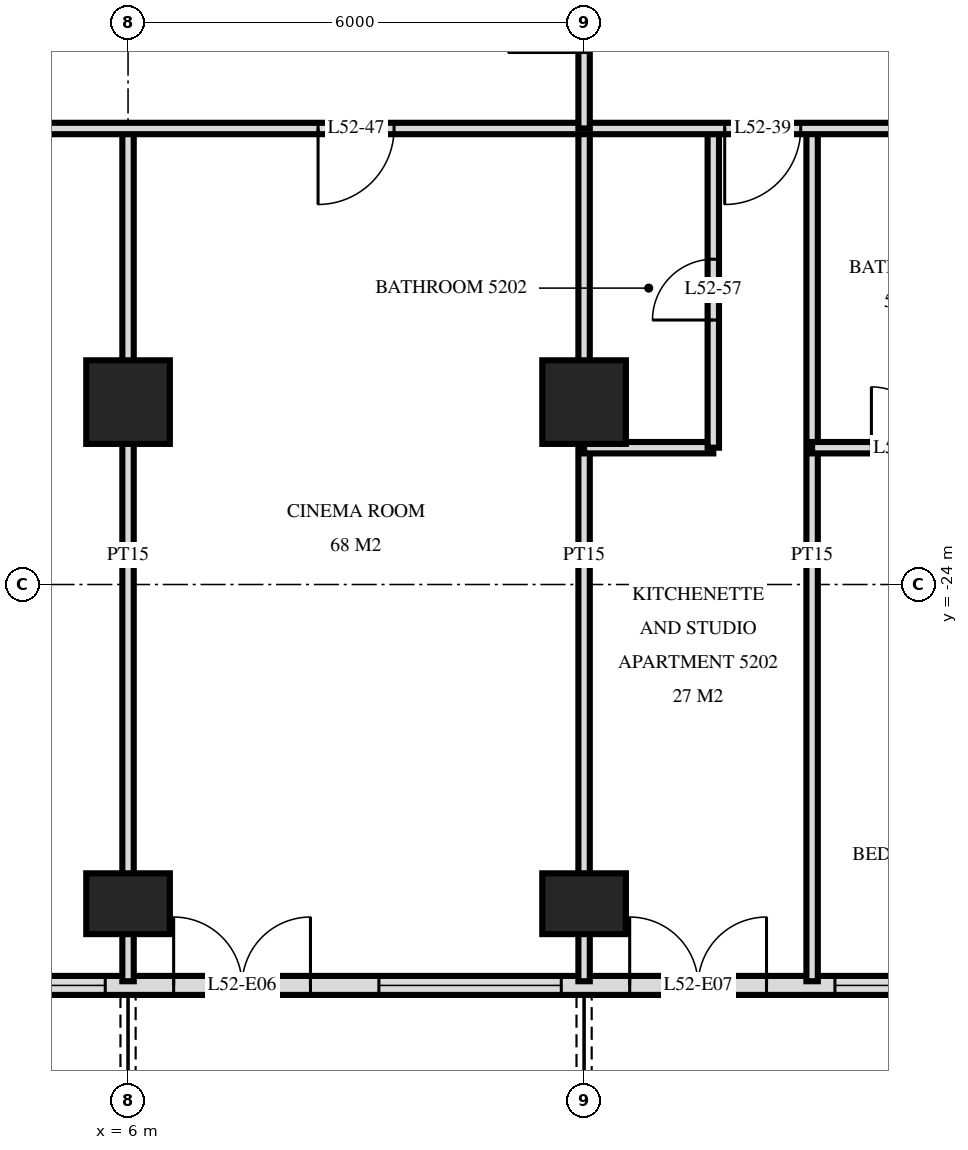
"""IFC4 building model, lengths in metres.
Left out: names, types, materials, properties, quantities, classifications, styles, units other than length and angle.
Written with IfcOpenShell. Run it as: python <this file> out.ifc"""

import sys

from ifc_helpers import new_model, si_unit, direction, frame, frame_2d, origin, origin_2d, place, context, subcontext, project, spatial, rectangle, extrude, element, fill, save


model = new_model("IFC4")
c1 = context("Model", 3, precision=1e-05, world=origin(), true_north=direction((0.0, 1.0)))
c2 = subcontext(c1, "Body", "Model", "MODEL_VIEW")
j1 = project(units=[si_unit("LENGTHUNIT", "METRE"), si_unit("PLANEANGLEUNIT", "RADIAN")], contexts=[c1])
p1 = place(None, origin())
s1 = spatial("IfcSite", under=j1, at=p1, CompositionType="ELEMENT")
p2 = place(p1, origin())
s2 = spatial("IfcBuilding", under=s1, at=p2, CompositionType="ELEMENT")
p3 = place(p2, frame((0.0, 0.0, 201.1)))
s3 = spatial("IfcBuildingStorey", under=s2, at=p3, CompositionType="ELEMENT", Elevation=201.1)
p4 = place(p3, frame((6.0, -28.2, 0.0), z_axis=(0.0, 0.0, 1.0), x_axis=(1.0, 0.0, 0.0)))
e1 = element("IfcColumn", 1, at=p4, inside=s3, PredefinedType="COLUMN", context=c2, shape_type="SweptSolid", body=[
    extrude(rectangle(XDim=1.1, YDim=0.8, at=origin_2d()), origin(), (0.0, 0.0, 1.0), 3.5),
])
p5 = place(p3, frame((6.0, -21.6, 0.0), z_axis=(0.0, 0.0, 1.0), x_axis=(1.0, 0.0, 0.0)))
e2 = element("IfcColumn", 2, at=p5, inside=s3, PredefinedType="COLUMN", context=c2, shape_type="SweptSolid", body=[
    extrude(rectangle(XDim=1.1, YDim=1.1, at=origin_2d()), origin(), (0.0, 0.0, 1.0), 3.5),
])
p6 = place(p3, frame((12.0, -28.2, 0.0), z_axis=(0.0, 0.0, 1.0), x_axis=(1.0, 0.0, 0.0)))
e3 = element("IfcColumn", 3, at=p6, inside=s3, PredefinedType="COLUMN", context=c2, shape_type="SweptSolid", body=[
    extrude(rectangle(XDim=1.1, YDim=0.8, at=origin_2d()), origin(), (0.0, 0.0, 1.0), 3.5),
])
p7 = place(p3, frame((12.0, -21.6, 0.0), z_axis=(0.0, 0.0, 1.0), x_axis=(1.0, 0.0, 0.0)))
e4 = element("IfcColumn", 4, at=p7, inside=s3, PredefinedType="COLUMN", context=c2, shape_type="SweptSolid", body=[
    extrude(rectangle(XDim=1.1, YDim=1.1, at=origin_2d()), origin(), (0.0, 0.0, 1.0), 3.5),
])
p8 = place(p3, frame((-22.475, -29.275, 0.0), z_axis=(0.0, 0.0, 1.0), x_axis=(1.0, 0.0, 0.0)))
e5 = element("IfcWall", 5, at=p8, inside=s3, PredefinedType="SOLIDWALL", context=c2, shape_type="SweptSolid", body=[
    extrude(rectangle(XDim=44.951, YDim=0.25, at=frame_2d((22.475, 0.0))), origin(), (0.0, 0.0, 1.0), 3.22),
])
p9 = place(p8, frame((0.575, 0.0, 0.0)))
e6 = element("IfcOpeningElement", 6, at=p9, cuts=e5, PredefinedType="OPENING", context=c2, shape_type="SweptSolid", body=[
    extrude(rectangle(XDim=1.8, YDim=2.4, at=frame_2d((0.9, 1.2))), frame((0.0, 0.135, 0.0), z_axis=(0.0, -1.0, 0.0), x_axis=(1.0, 0.0, 0.0)), (0.0, 0.0, 1.0), 0.27),
])
p10 = place(p8, frame((4.775, 0.0, 0.9)))
e7 = element("IfcOpeningElement", 7, at=p10, cuts=e5, PredefinedType="OPENING", context=c2, shape_type="SweptSolid", body=[
    extrude(rectangle(XDim=2.4, YDim=1.5, at=frame_2d((1.2, 0.75))), frame((0.0, 0.135, 0.0), z_axis=(0.0, -1.0, 0.0), x_axis=(1.0, 0.0, 0.0)), (0.0, 0.0, 1.0), 0.27),
])
p11 = place(p8, frame((8.075, 0.0, 0.0)))
e8 = element("IfcOpeningElement", 8, at=p11, cuts=e5, PredefinedType="OPENING", context=c2, shape_type="SweptSolid", body=[
    extrude(rectangle(XDim=1.8, YDim=2.4, at=frame_2d((0.9, 1.2))), frame((0.0, 0.135, 0.0), z_axis=(0.0, -1.0, 0.0), x_axis=(1.0, 0.0, 0.0)), (0.0, 0.0, 1.0), 0.27),
])
p12 = place(p8, frame((11.075, 0.0, 0.0)))
e9 = element("IfcOpeningElement", 9, at=p12, cuts=e5, PredefinedType="OPENING", context=c2, shape_type="SweptSolid", body=[
    extrude(rectangle(XDim=1.8, YDim=2.4, at=frame_2d((0.9, 1.2))), frame((0.0, 0.135, 0.0), z_axis=(0.0, -1.0, 0.0), x_axis=(1.0, 0.0, 0.0)), (0.0, 0.0, 1.0), 0.27),
])
p13 = place(p8, frame((13.775, 0.0, 0.9)))
e10 = element("IfcOpeningElement", 10, at=p13, cuts=e5, PredefinedType="OPENING", context=c2, shape_type="SweptSolid", body=[
    extrude(rectangle(XDim=2.4, YDim=1.5, at=frame_2d((1.2, 0.75))), frame((0.0, 0.135, 0.0), z_axis=(0.0, -1.0, 0.0), x_axis=(1.0, 0.0, 0.0)), (0.0, 0.0, 1.0), 0.27),
])
p14 = place(p8, frame((16.775, 0.0, 0.9)))
e11 = element("IfcOpeningElement", 11, at=p14, cuts=e5, PredefinedType="OPENING", context=c2, shape_type="SweptSolid", body=[
    extrude(rectangle(XDim=2.4, YDim=1.5, at=frame_2d((1.2, 0.75))), frame((0.0, 0.135, 0.0), z_axis=(0.0, -1.0, 0.0), x_axis=(1.0, 0.0, 0.0)), (0.0, 0.0, 1.0), 0.27),
])
p15 = place(p8, frame((20.075, 0.0, 0.0)))
e12 = element("IfcOpeningElement", 12, at=p15, cuts=e5, PredefinedType="OPENING", context=c2, shape_type="SweptSolid", body=[
    extrude(rectangle(XDim=1.8, YDim=2.4, at=frame_2d((0.9, 1.2))), frame((0.0, 0.135, 0.0), z_axis=(0.0, -1.0, 0.0), x_axis=(1.0, 0.0, 0.0)), (0.0, 0.0, 1.0), 0.27),
])
p16 = place(p8, frame((23.075, 0.0, 0.0)))
e13 = element("IfcOpeningElement", 13, at=p16, cuts=e5, PredefinedType="OPENING", context=c2, shape_type="SweptSolid", body=[
    extrude(rectangle(XDim=1.8, YDim=2.4, at=frame_2d((0.9, 1.2))), frame((0.0, 0.135, 0.0), z_axis=(0.0, -1.0, 0.0), x_axis=(1.0, 0.0, 0.0)), (0.0, 0.0, 1.0), 0.27),
])
p17 = place(p8, frame((25.775, 0.0, 0.9)))
e14 = element("IfcOpeningElement", 14, at=p17, cuts=e5, PredefinedType="OPENING", context=c2, shape_type="SweptSolid", body=[
    extrude(rectangle(XDim=2.4, YDim=1.5, at=frame_2d((1.2, 0.75))), frame((0.0, 0.135, 0.0), z_axis=(0.0, -1.0, 0.0), x_axis=(1.0, 0.0, 0.0)), (0.0, 0.0, 1.0), 0.27),
])
p18 = place(p8, frame((29.075, 0.0, 0.0)))
e15 = element("IfcOpeningElement", 15, at=p18, cuts=e5, PredefinedType="OPENING", context=c2, shape_type="SweptSolid", body=[
    extrude(rectangle(XDim=1.8, YDim=2.4, at=frame_2d((0.9, 1.2))), frame((0.0, 0.135, 0.0), z_axis=(0.0, -1.0, 0.0), x_axis=(1.0, 0.0, 0.0)), (0.0, 0.0, 1.0), 0.27),
])
p19 = place(p8, frame((31.775, 0.0, 0.9)))
e16 = element("IfcOpeningElement", 16, at=p19, cuts=e5, PredefinedType="OPENING", context=c2, shape_type="SweptSolid", body=[
    extrude(rectangle(XDim=2.4, YDim=1.5, at=frame_2d((1.2, 0.75))), frame((0.0, 0.135, 0.0), z_axis=(0.0, -1.0, 0.0), x_axis=(1.0, 0.0, 0.0)), (0.0, 0.0, 1.0), 0.27),
])
p20 = place(p8, frame((35.075, 0.0, 0.0)))
e17 = element("IfcOpeningElement", 17, at=p20, cuts=e5, PredefinedType="OPENING", context=c2, shape_type="SweptSolid", body=[
    extrude(rectangle(XDim=1.8, YDim=2.4, at=frame_2d((0.9, 1.2))), frame((0.0, 0.135, 0.0), z_axis=(0.0, -1.0, 0.0), x_axis=(1.0, 0.0, 0.0)), (0.0, 0.0, 1.0), 0.27),
])
p21 = place(p8, frame((37.775, 0.0, 0.9)))
e18 = element("IfcOpeningElement", 18, at=p21, cuts=e5, PredefinedType="OPENING", context=c2, shape_type="SweptSolid", body=[
    extrude(rectangle(XDim=2.4, YDim=1.5, at=frame_2d((1.2, 0.75))), frame((0.0, 0.135, 0.0), z_axis=(0.0, -1.0, 0.0), x_axis=(1.0, 0.0, 0.0)), (0.0, 0.0, 1.0), 0.27),
])
p22 = place(p8, frame((41.075, 0.0, 0.0)))
e19 = element("IfcOpeningElement", 19, at=p22, cuts=e5, PredefinedType="OPENING", context=c2, shape_type="SweptSolid", body=[
    extrude(rectangle(XDim=1.8, YDim=2.4, at=frame_2d((0.9, 1.2))), frame((0.0, 0.135, 0.0), z_axis=(0.0, -1.0, 0.0), x_axis=(1.0, 0.0, 0.0)), (0.0, 0.0, 1.0), 0.27),
])
p23 = place(p3, frame((15.0, -29.22, 0.0), z_axis=(0.0, 0.0, 1.0), x_axis=(0.0, 1.0, 0.0)))
e20 = element("IfcWall", 20, at=p23, inside=s3, PredefinedType="PARTITIONING", context=c2, shape_type="SweptSolid", body=[
    extrude(rectangle(XDim=11.22, YDim=0.15, at=frame_2d((5.61, 0.0))), origin(), (0.0, 0.0, 1.0), 3.22),
])
p24 = place(p3, frame((13.7, -22.2, 0.0), z_axis=(0.0, 0.0, 1.0), x_axis=(0.0, 1.0, 0.0)))
e21 = element("IfcWall", 21, at=p24, inside=s3, PredefinedType="PARTITIONING", context=c2, shape_type="SweptSolid", body=[
    extrude(rectangle(XDim=4.2, YDim=0.15, at=frame_2d((2.1, 0.0))), origin(), (0.0, 0.0, 1.0), 3.22),
])
p25 = place(p24, frame((1.68, 0.0, 0.0)))
e22 = element("IfcOpeningElement", 22, at=p25, cuts=e21, PredefinedType="OPENING", context=c2, shape_type="SweptSolid", body=[
    extrude(rectangle(XDim=0.8, YDim=2.1, at=frame_2d((0.4, 1.05))), frame((0.0, 0.085, 0.0), z_axis=(0.0, -1.0, 0.0), x_axis=(1.0, 0.0, 0.0)), (0.0, 0.0, 1.0), 0.17),
])
p26 = place(p3, frame((12.0, -18.0, 0.0), z_axis=(0.0, 0.0, 1.0), x_axis=(0.0, 1.0, 0.0)))
e23 = element("IfcWall", 23, at=p26, inside=s3, PredefinedType="PARTITIONING", context=c2, shape_type="SweptSolid", body=[
    extrude(rectangle(XDim=2.95, YDim=0.15, at=frame_2d((1.475, 0.0))), origin(), (0.0, 0.0, 1.0), 3.22),
])
p27 = place(p26, frame((1.0, 0.0, 0.0)))
e24 = element("IfcOpeningElement", 24, at=p27, cuts=e23, PredefinedType="OPENING", context=c2, shape_type="SweptSolid", body=[
    extrude(rectangle(XDim=1.0, YDim=2.1, at=frame_2d((0.5, 1.05))), frame((0.0, 0.085, 0.0), z_axis=(0.0, -1.0, 0.0), x_axis=(1.0, 0.0, 0.0)), (0.0, 0.0, 1.0), 0.17),
])
for number, where, z_axis, x_axis in (
    (25, (12.0, -29.22, 0.0), (0.0, 0.0, 1.0), (0.0, 1.0, 0.0)),
    (26, (6.0, -29.22, 0.0), (0.0, 0.0, 1.0), (0.0, 1.0, 0.0)),
):
    element("IfcWall", number, at=place(p3, frame(where, z_axis=z_axis, x_axis=x_axis)), inside=s3, PredefinedType="PARTITIONING", context=c2, shape_type="SweptSolid", body=[
        extrude(rectangle(XDim=11.22, YDim=0.15, at=frame_2d((5.61, 0.0))), origin(), (0.0, 0.0, 1.0), 3.22),
    ])
p28 = place(p3, frame((12.0, -22.2, 0.0), z_axis=(0.0, 0.0, 1.0), x_axis=(1.0, 0.0, 0.0)))
e27 = element("IfcWall", 27, at=p28, inside=s3, PredefinedType="PARTITIONING", context=c2, shape_type="SweptSolid", body=[
    extrude(rectangle(XDim=1.7, YDim=0.15, at=frame_2d((0.85, 0.0))), origin(), (0.0, 0.0, 1.0), 3.22),
])
p29 = place(p3, frame((15.0, -22.2, 0.0), z_axis=(0.0, 0.0, 1.0), x_axis=(1.0, 0.0, 0.0)))
e28 = element("IfcWall", 28, at=p29, inside=s3, PredefinedType="PARTITIONING", context=c2, shape_type="SweptSolid", body=[
    extrude(rectangle(XDim=6.4, YDim=0.15, at=frame_2d((3.2, 0.0))), origin(), (0.0, 0.0, 1.0), 3.22),
])
p30 = place(p29, frame((0.78, 0.0, 0.0)))
e29 = element("IfcOpeningElement", 29, at=p30, cuts=e28, PredefinedType="OPENING", context=c2, shape_type="SweptSolid", body=[
    extrude(rectangle(XDim=0.8, YDim=2.1, at=frame_2d((0.4, 1.05))), frame((0.0, 0.085, 0.0), z_axis=(0.0, -1.0, 0.0), x_axis=(1.0, 0.0, 0.0)), (0.0, 0.0, 1.0), 0.17),
])
p31 = place(p29, frame((3.65, 0.0, 0.0)))
e30 = element("IfcOpeningElement", 30, at=p31, cuts=e28, PredefinedType="OPENING", context=c2, shape_type="SweptSolid", body=[
    extrude(rectangle(XDim=0.8, YDim=2.1, at=frame_2d((0.4, 1.05))), frame((0.0, 0.085, 0.0), z_axis=(0.0, -1.0, 0.0), x_axis=(1.0, 0.0, 0.0)), (0.0, 0.0, 1.0), 0.17),
])
p32 = place(p3, frame((-26.82, -18.0, 0.0), z_axis=(0.0, 0.0, 1.0), x_axis=(1.0, 0.0, 0.0)))
e31 = element("IfcWall", 31, at=p32, inside=s3, PredefinedType="PARTITIONING", context=c2, shape_type="SweptSolid", body=[
    extrude(rectangle(XDim=53.64, YDim=0.15, at=frame_2d((26.82, 0.0))), origin(), (0.0, 0.0, 1.0), 3.22),
])
p33 = place(p32, frame((11.97, 0.0, 0.0)))
e32 = element("IfcOpeningElement", 32, at=p33, cuts=e31, PredefinedType="OPENING", context=c2, shape_type="SweptSolid", body=[
    extrude(rectangle(XDim=1.0, YDim=2.1, at=frame_2d((0.5, 1.05))), frame((0.0, 0.085, 0.0), z_axis=(0.0, -1.0, 0.0), x_axis=(1.0, 0.0, 0.0)), (0.0, 0.0, 1.0), 0.17),
])
p34 = place(p32, frame((3.92, 0.0, 0.0)))
e33 = element("IfcOpeningElement", 33, at=p34, cuts=e31, PredefinedType="OPENING", context=c2, shape_type="SweptSolid", body=[
    extrude(rectangle(XDim=1.0, YDim=2.1, at=frame_2d((0.5, 1.05))), frame((0.0, 0.085, 0.0), z_axis=(0.0, -1.0, 0.0), x_axis=(1.0, 0.0, 0.0)), (0.0, 0.0, 1.0), 0.17),
])
p35 = place(p32, frame((5.72, 0.0, 0.0)))
e34 = element("IfcOpeningElement", 34, at=p35, cuts=e31, PredefinedType="OPENING", context=c2, shape_type="SweptSolid", body=[
    extrude(rectangle(XDim=1.0, YDim=2.1, at=frame_2d((0.5, 1.05))), frame((0.0, 0.085, 0.0), z_axis=(0.0, -1.0, 0.0), x_axis=(1.0, 0.0, 0.0)), (0.0, 0.0, 1.0), 0.17),
])
p36 = place(p32, frame((40.67, 0.0, 0.0)))
e35 = element("IfcOpeningElement", 35, at=p36, cuts=e31, PredefinedType="OPENING", context=c2, shape_type="SweptSolid", body=[
    extrude(rectangle(XDim=1.0, YDim=2.1, at=frame_2d((0.5, 1.05))), frame((0.0, 0.085, 0.0), z_axis=(0.0, -1.0, 0.0), x_axis=(1.0, 0.0, 0.0)), (0.0, 0.0, 1.0), 0.17),
])
p37 = place(p32, frame((48.72, 0.0, 0.0)))
e36 = element("IfcOpeningElement", 36, at=p37, cuts=e31, PredefinedType="OPENING", context=c2, shape_type="SweptSolid", body=[
    extrude(rectangle(XDim=1.0, YDim=2.1, at=frame_2d((0.5, 1.05))), frame((0.0, 0.085, 0.0), z_axis=(0.0, -1.0, 0.0), x_axis=(1.0, 0.0, 0.0)), (0.0, 0.0, 1.0), 0.17),
])
p38 = place(p32, frame((46.92, 0.0, 0.0)))
e37 = element("IfcOpeningElement", 37, at=p38, cuts=e31, PredefinedType="OPENING", context=c2, shape_type="SweptSolid", body=[
    extrude(rectangle(XDim=1.0, YDim=2.1, at=frame_2d((0.5, 1.05))), frame((0.0, 0.085, 0.0), z_axis=(0.0, -1.0, 0.0), x_axis=(1.0, 0.0, 0.0)), (0.0, 0.0, 1.0), 0.17),
])
p39 = place(p32, frame((17.32, 0.0, 0.0)))
e38 = element("IfcOpeningElement", 38, at=p39, cuts=e31, PredefinedType="OPENING", context=c2, shape_type="SweptSolid", body=[
    extrude(rectangle(XDim=1.0, YDim=2.1, at=frame_2d((0.5, 1.05))), frame((0.0, 0.085, 0.0), z_axis=(0.0, -1.0, 0.0), x_axis=(1.0, 0.0, 0.0)), (0.0, 0.0, 1.0), 0.17),
])
p40 = place(p32, frame((23.32, 0.0, 0.0)))
e39 = element("IfcOpeningElement", 39, at=p40, cuts=e31, PredefinedType="OPENING", context=c2, shape_type="SweptSolid", body=[
    extrude(rectangle(XDim=1.0, YDim=2.1, at=frame_2d((0.5, 1.05))), frame((0.0, 0.085, 0.0), z_axis=(0.0, -1.0, 0.0), x_axis=(1.0, 0.0, 0.0)), (0.0, 0.0, 1.0), 0.17),
])
p41 = place(p32, frame((29.32, 0.0, 0.0)))
e40 = element("IfcOpeningElement", 40, at=p41, cuts=e31, PredefinedType="OPENING", context=c2, shape_type="SweptSolid", body=[
    extrude(rectangle(XDim=1.0, YDim=2.1, at=frame_2d((0.5, 1.05))), frame((0.0, 0.085, 0.0), z_axis=(0.0, -1.0, 0.0), x_axis=(1.0, 0.0, 0.0)), (0.0, 0.0, 1.0), 0.17),
])
p42 = place(p32, frame((35.32, 0.0, 0.0)))
e41 = element("IfcOpeningElement", 41, at=p42, cuts=e31, PredefinedType="OPENING", context=c2, shape_type="SweptSolid", body=[
    extrude(rectangle(XDim=1.0, YDim=2.1, at=frame_2d((0.5, 1.05))), frame((0.0, 0.085, 0.0), z_axis=(0.0, -1.0, 0.0), x_axis=(1.0, 0.0, 0.0)), (0.0, 0.0, 1.0), 0.17),
])
p43 = place(p17, origin())
e42 = element("IfcWindow", 42, at=p43, inside=s3, PartitioningType="SINGLE_PANEL", PredefinedType="WINDOW", context=c2, shape_type="SweptSolid", body=[
    extrude(rectangle(XDim=2.4, YDim=1.5, at=frame_2d((1.2, 0.75))), frame((0.0, 0.03, 0.0), z_axis=(0.0, -1.0, 0.0), x_axis=(1.0, 0.0, 0.0)), (0.0, 0.0, 1.0), 0.06),
])
fill(e14, e42)
p44 = place(p18, origin())
e43 = element("IfcDoor", 43, at=p44, inside=s3, OperationType="DOUBLE_DOOR_SINGLE_SWING", PredefinedType="DOOR", context=c2, shape_type="SweptSolid", body=[
    extrude(rectangle(XDim=1.8, YDim=2.4, at=frame_2d((0.9, 1.2))), frame((0.0, 0.025, 0.0), z_axis=(0.0, -1.0, 0.0), x_axis=(1.0, 0.0, 0.0)), (0.0, 0.0, 1.0), 0.05),
])
fill(e15, e43)
p45 = place(p19, origin())
e44 = element("IfcWindow", 44, at=p45, inside=s3, PartitioningType="SINGLE_PANEL", PredefinedType="WINDOW", context=c2, shape_type="SweptSolid", body=[
    extrude(rectangle(XDim=2.4, YDim=1.5, at=frame_2d((1.2, 0.75))), frame((0.0, 0.03, 0.0), z_axis=(0.0, -1.0, 0.0), x_axis=(1.0, 0.0, 0.0)), (0.0, 0.0, 1.0), 0.06),
])
fill(e16, e44)
p46 = place(p20, origin())
e45 = element("IfcDoor", 45, at=p46, inside=s3, OperationType="DOUBLE_DOOR_SINGLE_SWING", PredefinedType="DOOR", context=c2, shape_type="SweptSolid", body=[
    extrude(rectangle(XDim=1.8, YDim=2.4, at=frame_2d((0.9, 1.2))), frame((0.0, 0.025, 0.0), z_axis=(0.0, -1.0, 0.0), x_axis=(1.0, 0.0, 0.0)), (0.0, 0.0, 1.0), 0.05),
])
fill(e17, e45)
p47 = place(p21, origin())
e46 = element("IfcWindow", 46, at=p47, inside=s3, PartitioningType="SINGLE_PANEL", PredefinedType="WINDOW", context=c2, shape_type="SweptSolid", body=[
    extrude(rectangle(XDim=2.4, YDim=1.5, at=frame_2d((1.2, 0.75))), frame((0.0, 0.03, 0.0), z_axis=(0.0, -1.0, 0.0), x_axis=(1.0, 0.0, 0.0)), (0.0, 0.0, 1.0), 0.06),
])
fill(e18, e46)
p48 = place(p36, frame((0.5, 0.0, 0.0), z_axis=(0.0, 0.0, 1.0), x_axis=(-1.0, 0.0, 0.0)))
e47 = element("IfcDoor", 47, at=p48, inside=s3, OperationType="SINGLE_SWING_LEFT", PredefinedType="DOOR", context=c2, shape_type="SweptSolid", body=[
    extrude(rectangle(XDim=1.0, YDim=2.1, at=frame_2d((0.0, 1.05))), frame((0.0, -0.025, 0.0), z_axis=(0.0, 1.0, 0.0), x_axis=(-1.0, 0.0, 0.0)), (0.0, 0.0, 1.0), 0.05),
])
fill(e35, e47)
p49 = place(p42, frame((0.5, 0.0, 0.0), z_axis=(0.0, 0.0, 1.0), x_axis=(-1.0, 0.0, 0.0)))
e48 = element("IfcDoor", 48, at=p49, inside=s3, OperationType="SINGLE_SWING_LEFT", PredefinedType="DOOR", context=c2, shape_type="SweptSolid", body=[
    extrude(rectangle(XDim=1.0, YDim=2.1, at=frame_2d((0.0, 1.05))), frame((0.0, -0.025, 0.0), z_axis=(0.0, 1.0, 0.0), x_axis=(-1.0, 0.0, 0.0)), (0.0, 0.0, 1.0), 0.05),
])
fill(e41, e48)
p50 = place(p25, origin())
e49 = element("IfcDoor", 49, at=p50, inside=s3, OperationType="SINGLE_SWING_RIGHT", PredefinedType="DOOR", context=c2, shape_type="SweptSolid", body=[
    extrude(rectangle(XDim=0.8, YDim=2.1, at=frame_2d((0.4, 1.05))), frame((0.0, 0.025, 0.0), z_axis=(0.0, -1.0, 0.0), x_axis=(1.0, 0.0, 0.0)), (0.0, 0.0, 1.0), 0.05),
])
fill(e22, e49)
p51 = place(p30, origin())
e50 = element("IfcDoor", 50, at=p51, inside=s3, OperationType="SINGLE_SWING_RIGHT", PredefinedType="DOOR", context=c2, shape_type="SweptSolid", body=[
    extrude(rectangle(XDim=0.8, YDim=2.1, at=frame_2d((0.4, 1.05))), frame((0.0, 0.025, 0.0), z_axis=(0.0, -1.0, 0.0), x_axis=(1.0, 0.0, 0.0)), (0.0, 0.0, 1.0), 0.05),
])
fill(e29, e50)
save(model, sys.argv[1])
